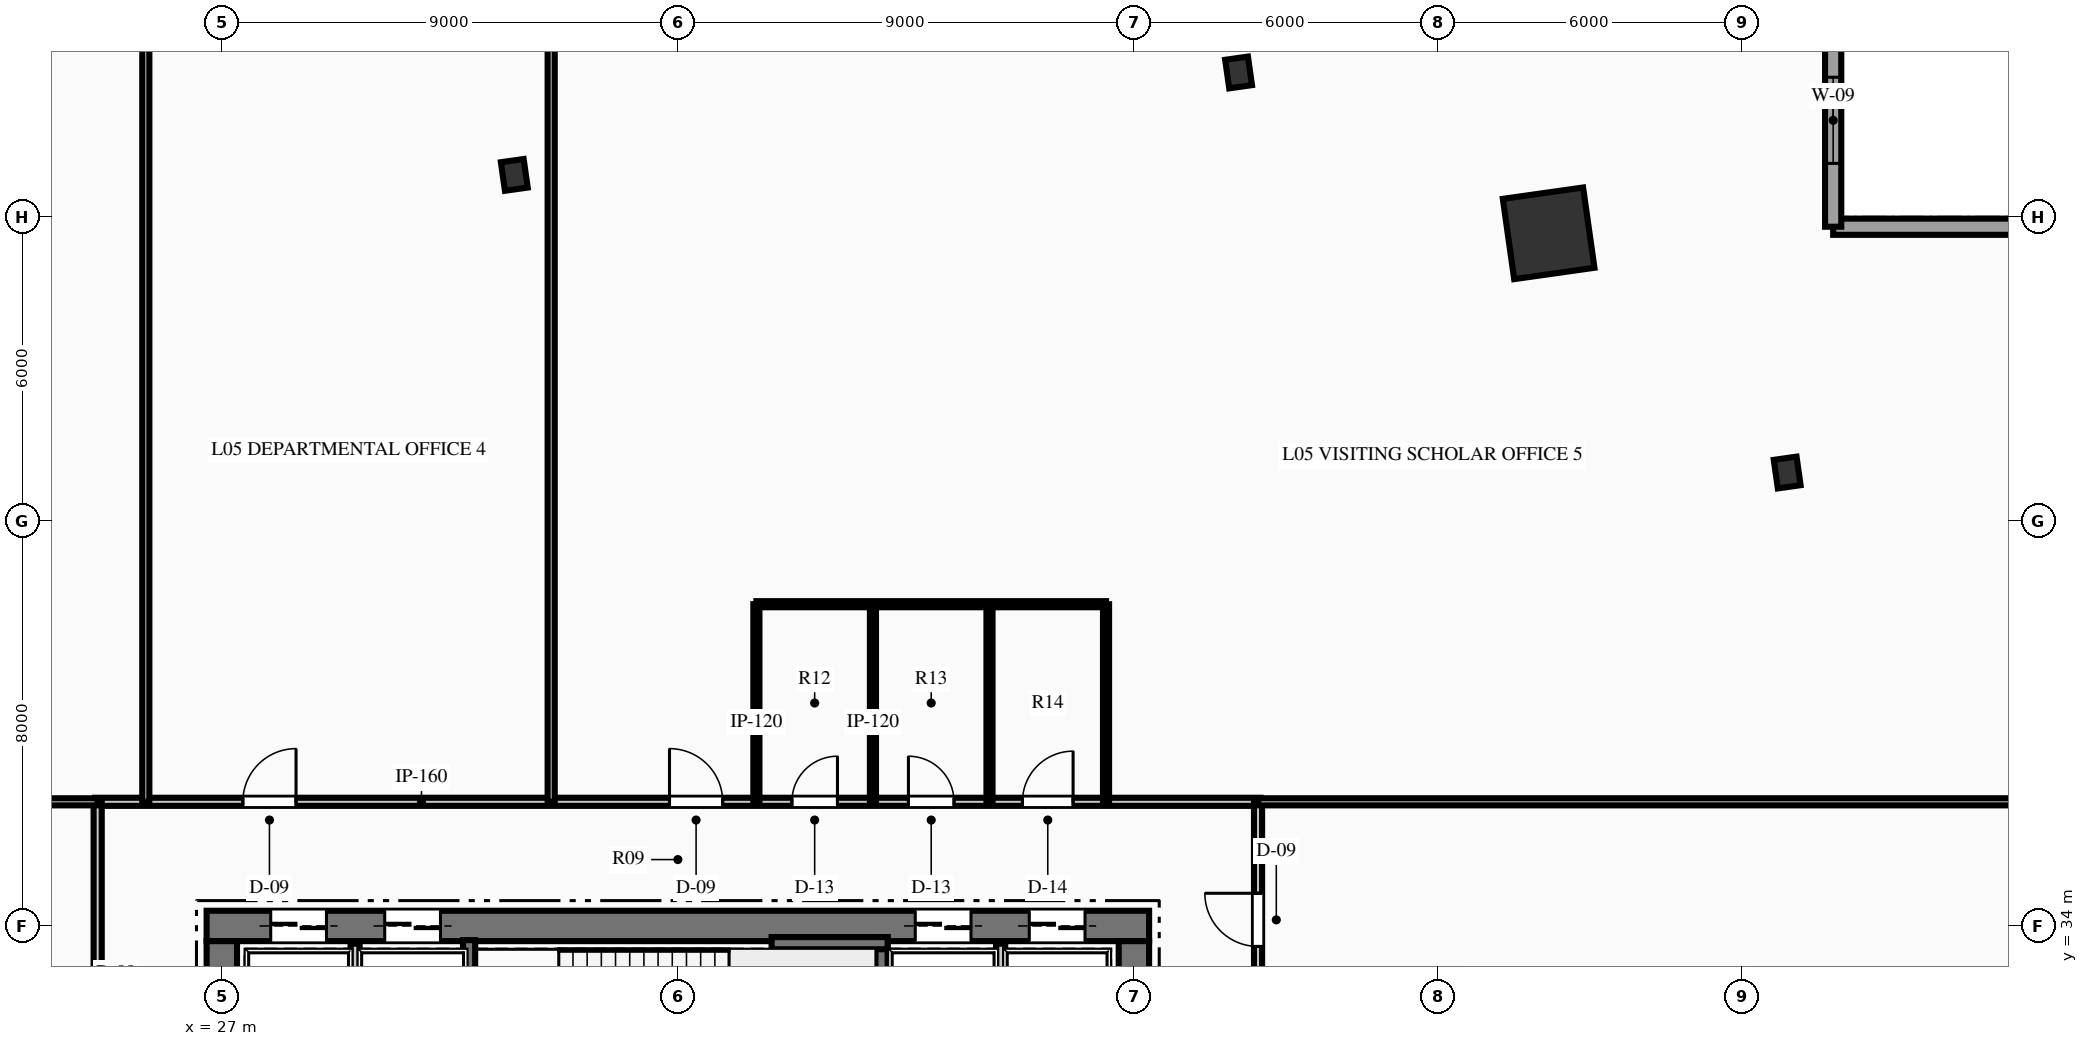
"""IFC4 building model, lengths in metres.
Left out: names, types, materials, properties, quantities, classifications, styles, units other than length and angle.
Written with IfcOpenShell. Run it as: python <this file> out.ifc"""

import sys

from ifc_helpers import new_model, si_unit, direction, frame, frame_2d, origin, origin_2d, place, context, subcontext, project, spatial, rectangle, hollow_rectangle, i_section, extrude, element, fill, save


model = new_model("IFC4")
c1 = context("Model", 3, precision=1e-05, world=origin(), true_north=direction((0.0, 1.0)))
c2 = subcontext(c1, "Body", "Model", "MODEL_VIEW")
j1 = project(units=[si_unit("LENGTHUNIT", "METRE"), si_unit("PLANEANGLEUNIT", "RADIAN")], contexts=[c1])
p1 = place(None, origin())
s1 = spatial("IfcSite", under=j1, at=p1, CompositionType="ELEMENT")
p2 = place(p1, origin())
s2 = spatial("IfcBuilding", under=s1, at=p2, CompositionType="ELEMENT")
p3 = place(p2, frame((0.0, 0.0, 28.2)))
s3 = spatial("IfcBuildingStorey", under=s2, at=p3, CompositionType="ELEMENT", Elevation=28.2)
p4 = place(p3, frame((26.7, 34.0, 0.0), z_axis=(0.0, 0.0, 1.0), x_axis=(1.0, 0.0, 0.0)))
e1 = element("IfcWall", 1, at=p4, inside=s3, PredefinedType="SHEAR", context=c2, shape_type="SweptSolid", body=[
    extrude(rectangle(XDim=18.6, YDim=0.6, at=frame_2d((9.3, 0.0))), origin(), (0.0, 0.0, 1.0), 4.5),
])
p5 = place(p4, frame((1.265, 0.0, 0.0)))
e2 = element("IfcOpeningElement", 2, at=p5, cuts=e1, PredefinedType="OPENING", context=c2, shape_type="SweptSolid", body=[
    extrude(rectangle(XDim=1.1, YDim=2.15, at=frame_2d((0.55, 1.075))), frame((0.0, 0.31, 0.0), z_axis=(0.0, -1.0, 0.0), x_axis=(1.0, 0.0, 0.0)), (0.0, 0.0, 1.0), 0.62),
])
p6 = place(p4, frame((3.515, 0.0, 0.0)))
e3 = element("IfcOpeningElement", 3, at=p6, cuts=e1, PredefinedType="OPENING", context=c2, shape_type="SweptSolid", body=[
    extrude(rectangle(XDim=1.1, YDim=2.15, at=frame_2d((0.55, 1.075))), frame((0.0, 0.31, 0.0), z_axis=(0.0, -1.0, 0.0), x_axis=(1.0, 0.0, 0.0)), (0.0, 0.0, 1.0), 0.62),
])
p7 = place(p4, frame((13.985, 0.0, 0.0)))
e4 = element("IfcOpeningElement", 4, at=p7, cuts=e1, PredefinedType="OPENING", context=c2, shape_type="SweptSolid", body=[
    extrude(rectangle(XDim=1.1, YDim=2.15, at=frame_2d((0.55, 1.075))), frame((0.0, 0.31, 0.0), z_axis=(0.0, -1.0, 0.0), x_axis=(1.0, 0.0, 0.0)), (0.0, 0.0, 1.0), 0.62),
])
p8 = place(p4, frame((16.235, 0.0, 0.0)))
e5 = element("IfcOpeningElement", 5, at=p8, cuts=e1, PredefinedType="OPENING", context=c2, shape_type="SweptSolid", body=[
    extrude(rectangle(XDim=1.1, YDim=2.15, at=frame_2d((0.55, 1.075))), frame((0.0, 0.31, 0.0), z_axis=(0.0, -1.0, 0.0), x_axis=(1.0, 0.0, 0.0)), (0.0, 0.0, 1.0), 0.62),
])
p9 = place(p3, frame((27.0, 18.3, 0.0), z_axis=(0.0, 0.0, 1.0), x_axis=(0.0, 1.0, 0.0)))
e6 = element("IfcWall", 6, at=p9, inside=s3, PredefinedType="SHEAR", context=c2, shape_type="SweptSolid", body=[
    extrude(rectangle(XDim=15.4, YDim=0.6, at=frame_2d((7.7, 0.0))), origin(), (0.0, 0.0, 1.0), 4.5),
])
p10 = place(p9, frame((9.94, 0.0, 0.0)))
e7 = element("IfcOpeningElement", 7, at=p10, cuts=e6, PredefinedType="OPENING", context=c2, shape_type="SweptSolid", body=[
    extrude(rectangle(XDim=1.4, YDim=2.2, at=frame_2d((0.7, 1.1))), frame((0.0, 0.31, 0.0), z_axis=(0.0, -1.0, 0.0), x_axis=(1.0, 0.0, 0.0)), (0.0, 0.0, 1.0), 0.62),
])
p11 = place(p3, frame((45.0, 18.3, 0.0), z_axis=(0.0, 0.0, 1.0), x_axis=(0.0, 1.0, 0.0)))
e8 = element("IfcWall", 8, at=p11, inside=s3, PredefinedType="SHEAR", context=c2, shape_type="SweptSolid", body=[
    extrude(rectangle(XDim=15.4, YDim=0.6, at=frame_2d((7.7, 0.0))), origin(), (0.0, 0.0, 1.0), 4.5),
])
p12 = place(p11, frame((9.94, 0.0, 0.0)))
e9 = element("IfcOpeningElement", 9, at=p12, cuts=e8, PredefinedType="OPENING", context=c2, shape_type="SweptSolid", body=[
    extrude(rectangle(XDim=1.4, YDim=2.2, at=frame_2d((0.7, 1.1))), frame((0.0, 0.31, 0.0), z_axis=(0.0, -1.0, 0.0), x_axis=(1.0, 0.0, 0.0)), (0.0, 0.0, 1.0), 0.62),
])
p13 = place(p3, frame((31.88, 29.93, 0.0), z_axis=(0.0, 0.0, 1.0), x_axis=(0.0, 1.0, 0.0)))
e10 = element("IfcWall", 10, at=p13, inside=s3, PredefinedType="SHEAR", context=c2, shape_type="SweptSolid", body=[
    extrude(rectangle(XDim=3.79, YDim=0.24, at=frame_2d((1.895, 0.0))), origin(), (0.0, 0.0, 1.0), 4.5),
])
p14 = place(p3, frame((40.02, 29.93, 0.0), z_axis=(0.0, 0.0, 1.0), x_axis=(0.0, 1.0, 0.0)))
e11 = element("IfcWall", 11, at=p14, inside=s3, PredefinedType="SHEAR", context=c2, shape_type="SweptSolid", body=[
    extrude(rectangle(XDim=3.85, YDim=0.24, at=frame_2d((1.925, 0.0))), origin(), (0.0, 0.0, 1.0), 4.5),
])
p15 = place(p3, frame((37.85, 33.66, 0.0), z_axis=(0.0, 0.0, 1.0), x_axis=(1.0, 0.0, 0.0)))
e12 = element("IfcWall", 12, at=p15, inside=s3, PredefinedType="SHEAR", context=c2, shape_type="SweptSolid", body=[
    extrude(rectangle(XDim=2.29, YDim=0.24, at=frame_2d((1.145, 0.0))), origin(), (0.0, 0.0, 1.0), 4.5),
])
p16 = place(p3, frame((53.185, 47.67, 0.0), z_axis=(0.0, 0.0, 1.0), x_axis=(0.990146240249, 0.140037219771, 0.0)))
e13 = element("IfcColumn", 13, at=p16, inside=s3, PredefinedType="COLUMN", context=c2, shape_type="SweptSolid", body=[
    extrude(hollow_rectangle(XDim=1.6, YDim=1.6, WallThickness=0.08, at=origin_2d()), origin(), (0.0, 0.0, 1.0), 4.5),
])
for number, where, z_axis, x_axis in (
    (14, (57.892, 42.949, 0.0), (0.0, 0.0, 1.0), (0.99, 0.14, 0.0)),
    (15, (47.066, 50.844, 0.0), (0.0, 0.0, 1.0), (0.99, 0.14, 0.0)),
    (16, (32.772, 48.823, 0.0), (0.0, 0.0, 1.0), (0.99, 0.14, 0.0)),
):
    element("IfcColumn", number, at=place(p3, frame(where, z_axis=z_axis, x_axis=x_axis)), inside=s3, PredefinedType="COLUMN", context=c2, shape_type="SweptSolid", body=[
        extrude(i_section(OverallWidth=0.454, OverallDepth=0.569, WebThickness=0.078, FlangeThickness=0.125, at=origin_2d()), origin(), (0.0, 0.0, 1.0), 4.5),
    ])
p17 = place(p3, frame((58.8, 47.8, 0.0), z_axis=(0.0, 0.0, 1.0), x_axis=(1.0, 0.0, 0.0)))
e17 = element("IfcWall", 17, at=p17, inside=s3, PredefinedType="STANDARD", context=c2, shape_type="SweptSolid", body=[
    extrude(rectangle(XDim=4.2, YDim=0.32, at=frame_2d((2.1, 0.0))), origin(), (0.0, 0.0, 1.0), 4.19),
])
p18 = place(p3, frame((58.8, 52.0, 0.0), z_axis=(0.0, 0.0, 1.0), x_axis=(0.0, -1.0, 0.0)))
e18 = element("IfcWall", 18, at=p18, inside=s3, PredefinedType="STANDARD", context=c2, shape_type="SweptSolid", body=[
    extrude(rectangle(XDim=4.2, YDim=0.32, at=frame_2d((2.1, 0.0))), origin(), (0.0, 0.0, 1.0), 4.19),
])
p19 = place(p18, frame((1.25, 0.0, 0.75)))
e19 = element("IfcOpeningElement", 19, at=p19, cuts=e18, PredefinedType="OPENING", context=c2, shape_type="SweptSolid", body=[
    extrude(rectangle(XDim=1.7, YDim=2.5, at=frame_2d((0.85, 1.25))), frame((0.0, 0.17, 0.0), z_axis=(0.0, -1.0, 0.0), x_axis=(1.0, 0.0, 0.0)), (0.0, 0.0, 1.0), 0.34),
])
for number, where, z_axis, x_axis in (
    (20, (29.63, 29.9, 0.0), (0.0, 0.0, 1.0), (0.0, 1.0, 0.0)),
    (21, (42.37, 29.9, 0.0), (0.0, 0.0, 1.0), (0.0, 1.0, 0.0)),
):
    element("IfcWall", number, at=place(p3, frame(where, z_axis=z_axis, x_axis=x_axis)), inside=s3, PredefinedType="PARTITIONING", context=c2, shape_type="SweptSolid", body=[
        extrude(rectangle(XDim=3.75, YDim=0.18, at=frame_2d((1.875, 0.0))), origin(), (0.0, 0.0, 1.0), 4.19),
    ])
p20 = place(p3, frame((24.5, 36.45, 0.0), z_axis=(0.0, 0.0, 1.0), x_axis=(1.0, 0.0, 0.0)))
e22 = element("IfcWall", 22, at=p20, inside=s3, PredefinedType="PARTITIONING", context=c2, shape_type="SweptSolid", body=[
    extrude(rectangle(XDim=23.0, YDim=0.16, at=frame_2d((11.5, 0.0))), origin(), (0.0, 0.0, 1.0), 4.19),
])
p21 = place(p20, frame((13.75, 0.0, 0.0)))
e23 = element("IfcOpeningElement", 23, at=p21, cuts=e22, PredefinedType="OPENING", context=c2, shape_type="SweptSolid", body=[
    extrude(rectangle(XDim=0.9, YDim=2.15, at=frame_2d((0.45, 1.075))), frame((0.0, 0.09, 0.0), z_axis=(0.0, -1.0, 0.0), x_axis=(1.0, 0.0, 0.0)), (0.0, 0.0, 1.0), 0.18),
])
p22 = place(p20, frame((16.05, 0.0, 0.0)))
e24 = element("IfcOpeningElement", 24, at=p22, cuts=e22, PredefinedType="OPENING", context=c2, shape_type="SweptSolid", body=[
    extrude(rectangle(XDim=0.9, YDim=2.15, at=frame_2d((0.45, 1.075))), frame((0.0, 0.09, 0.0), z_axis=(0.0, -1.0, 0.0), x_axis=(1.0, 0.0, 0.0)), (0.0, 0.0, 1.0), 0.18),
])
p23 = place(p20, frame((18.3, 0.0, 0.0)))
e25 = element("IfcOpeningElement", 25, at=p23, cuts=e22, PredefinedType="OPENING", context=c2, shape_type="SweptSolid", body=[
    extrude(rectangle(XDim=1.0, YDim=2.15, at=frame_2d((0.5, 1.075))), frame((0.0, 0.09, 0.0), z_axis=(0.0, -1.0, 0.0), x_axis=(1.0, 0.0, 0.0)), (0.0, 0.0, 1.0), 0.18),
])
p24 = place(p20, frame((2.915, 0.0, 0.0)))
e26 = element("IfcOpeningElement", 26, at=p24, cuts=e22, PredefinedType="OPENING", context=c2, shape_type="SweptSolid", body=[
    extrude(rectangle(XDim=1.05, YDim=2.15, at=frame_2d((0.525, 1.075))), frame((0.0, 0.09, 0.0), z_axis=(0.0, -1.0, 0.0), x_axis=(1.0, 0.0, 0.0)), (0.0, 0.0, 1.0), 0.18),
])
p25 = place(p20, frame((11.335, 0.0, 0.0)))
e27 = element("IfcOpeningElement", 27, at=p25, cuts=e22, PredefinedType="OPENING", context=c2, shape_type="SweptSolid", body=[
    extrude(rectangle(XDim=1.05, YDim=2.15, at=frame_2d((0.525, 1.075))), frame((0.0, 0.09, 0.0), z_axis=(0.0, -1.0, 0.0), x_axis=(1.0, 0.0, 0.0)), (0.0, 0.0, 1.0), 0.18),
])
p26 = place(p3, frame((24.55, 15.55, 0.0), z_axis=(0.0, 0.0, 1.0), x_axis=(0.0, 1.0, 0.0)))
e28 = element("IfcWall", 28, at=p26, inside=s3, PredefinedType="PARTITIONING", context=c2, shape_type="SweptSolid", body=[
    extrude(rectangle(XDim=20.9, YDim=0.16, at=frame_2d((10.45, 0.0))), origin(), (0.0, 0.0, 1.0), 4.19),
])
p27 = place(p26, frame((2.052, 0.0, 0.0)))
e29 = element("IfcOpeningElement", 29, at=p27, cuts=e28, PredefinedType="OPENING", context=c2, shape_type="SweptSolid", body=[
    extrude(rectangle(XDim=1.05, YDim=2.15, at=frame_2d((0.525, 1.075))), frame((0.0, 0.09, 0.0), z_axis=(0.0, -1.0, 0.0), x_axis=(1.0, 0.0, 0.0)), (0.0, 0.0, 1.0), 0.18),
])
p28 = place(p26, frame((15.645, 0.0, 0.0)))
e30 = element("IfcOpeningElement", 30, at=p28, cuts=e28, PredefinedType="OPENING", context=c2, shape_type="SweptSolid", body=[
    extrude(rectangle(XDim=1.05, YDim=2.15, at=frame_2d((0.525, 1.075))), frame((0.0, 0.09, 0.0), z_axis=(0.0, -1.0, 0.0), x_axis=(1.0, 0.0, 0.0)), (0.0, 0.0, 1.0), 0.18),
])
p29 = place(p3, frame((47.45, 15.55, 0.0), z_axis=(0.0, 0.0, 1.0), x_axis=(0.0, 1.0, 0.0)))
e31 = element("IfcWall", 31, at=p29, inside=s3, PredefinedType="PARTITIONING", context=c2, shape_type="SweptSolid", body=[
    extrude(rectangle(XDim=20.9, YDim=0.16, at=frame_2d((10.45, 0.0))), origin(), (0.0, 0.0, 1.0), 4.19),
])
p30 = place(p29, frame((3.747, 0.0, 0.0)))
e32 = element("IfcOpeningElement", 32, at=p30, cuts=e31, PredefinedType="OPENING", context=c2, shape_type="SweptSolid", body=[
    extrude(rectangle(XDim=1.05, YDim=2.15, at=frame_2d((0.525, 1.075))), frame((0.0, 0.09, 0.0), z_axis=(0.0, -1.0, 0.0), x_axis=(1.0, 0.0, 0.0)), (0.0, 0.0, 1.0), 0.18),
])
p31 = place(p29, frame((7.865, 0.0, 0.0)))
e33 = element("IfcOpeningElement", 33, at=p31, cuts=e31, PredefinedType="OPENING", context=c2, shape_type="SweptSolid", body=[
    extrude(rectangle(XDim=1.05, YDim=2.15, at=frame_2d((0.525, 1.075))), frame((0.0, 0.09, 0.0), z_axis=(0.0, -1.0, 0.0), x_axis=(1.0, 0.0, 0.0)), (0.0, 0.0, 1.0), 0.18),
])
p32 = place(p29, frame((18.045, 0.0, 0.0)))
e34 = element("IfcOpeningElement", 34, at=p32, cuts=e31, PredefinedType="OPENING", context=c2, shape_type="SweptSolid", body=[
    extrude(rectangle(XDim=1.05, YDim=2.15, at=frame_2d((0.525, 1.075))), frame((0.0, 0.09, 0.0), z_axis=(0.0, -1.0, 0.0), x_axis=(1.0, 0.0, 0.0)), (0.0, 0.0, 1.0), 0.18),
])
for number, where, z_axis, x_axis in (
    (35, (37.55, 36.45, 0.0), (0.0, 0.0, 1.0), (0.0, 1.0, 0.0)),
    (36, (39.85, 36.45, 0.0), (0.0, 0.0, 1.0), (0.0, 1.0, 0.0)),
    (37, (42.15, 36.45, 0.0), (0.0, 0.0, 1.0), (0.0, 1.0, 0.0)),
    (38, (44.45, 36.45, 0.0), (0.0, 0.0, 1.0), (0.0, 1.0, 0.0)),
):
    element("IfcWall", number, at=place(p3, frame(where, z_axis=z_axis, x_axis=x_axis)), inside=s3, PredefinedType="PARTITIONING", context=c2, shape_type="SweptSolid", body=[
        extrude(rectangle(XDim=3.9, YDim=0.12, at=frame_2d((1.95, 0.0))), origin(), (0.0, 0.0, 1.0), 4.19),
    ])
p33 = place(p3, frame((37.55, 40.35, 0.0), z_axis=(0.0, 0.0, 1.0), x_axis=(1.0, 0.0, 0.0)))
e39 = element("IfcWall", 39, at=p33, inside=s3, PredefinedType="PARTITIONING", context=c2, shape_type="SweptSolid", body=[
    extrude(rectangle(XDim=6.9, YDim=0.12, at=frame_2d((3.45, 0.0))), origin(), (0.0, 0.0, 1.0), 4.19),
])
p34 = place(p3, frame((9.04, 36.45, 0.0), z_axis=(0.0, 0.0, 1.0), x_axis=(1.0, 0.0, 0.0)))
e40 = element("IfcWall", 40, at=p34, inside=s3, PredefinedType="PARTITIONING", context=c2, shape_type="SweptSolid", body=[
    extrude(rectangle(XDim=15.51, YDim=0.14, at=frame_2d((7.755, 0.0))), origin(), (0.0, 0.0, 1.0), 3.489),
])
p35 = place(p34, frame((10.51, 0.0, 0.0)))
e41 = element("IfcOpeningElement", 41, at=p35, cuts=e40, PredefinedType="OPENING", context=c2, shape_type="SweptSolid", body=[
    extrude(rectangle(XDim=0.95, YDim=2.15, at=frame_2d((0.475, 1.075))), frame((0.0, 0.08, 0.0), z_axis=(0.0, -1.0, 0.0), x_axis=(1.0, 0.0, 0.0)), (0.0, 0.0, 1.0), 0.16),
])
for number, where, z_axis, x_axis in (
    (42, (47.45, 36.45, 0.0), (0.0, 0.0, 1.0), (1.0, 0.0, 0.0)),
    (43, (25.5, 36.45, 0.0), (0.0, 0.0, 1.0), (0.0, 1.0, 0.0)),
    (44, (33.5, 36.45, 0.0), (0.0, 0.0, 1.0), (0.0, 1.0, 0.0)),
):
    element("IfcWall", number, at=place(p3, frame(where, z_axis=z_axis, x_axis=x_axis)), inside=s3, PredefinedType="PARTITIONING", context=c2, shape_type="SweptSolid", body=[
        extrude(rectangle(XDim=15.51, YDim=0.14, at=frame_2d((7.755, 0.0))), origin(), (0.0, 0.0, 1.0), 4.19),
    ])
p36 = place(p19, origin())
e45 = element("IfcWindow", 45, at=p36, inside=s3, PartitioningType="SINGLE_PANEL", PredefinedType="WINDOW", context=c2, shape_type="SweptSolid", body=[
    extrude(rectangle(XDim=1.7, YDim=2.5, at=frame_2d((0.85, 1.25))), frame((0.0, 0.03, 0.0), z_axis=(0.0, -1.0, 0.0), x_axis=(1.0, 0.0, 0.0)), (0.0, 0.0, 1.0), 0.06),
])
fill(e19, e45)
p37 = place(p21, origin())
e46 = element("IfcDoor", 46, at=p37, inside=s3, OperationType="SINGLE_SWING_RIGHT", PredefinedType="DOOR", context=c2, shape_type="SweptSolid", body=[
    extrude(rectangle(XDim=0.9, YDim=2.15, at=frame_2d((0.45, 1.075))), frame((0.0, 0.025, 0.0), z_axis=(0.0, -1.0, 0.0), x_axis=(1.0, 0.0, 0.0)), (0.0, 0.0, 1.0), 0.05),
])
fill(e23, e46)
p38 = place(p22, origin())
e47 = element("IfcDoor", 47, at=p38, inside=s3, OperationType="SINGLE_SWING_LEFT", PredefinedType="DOOR", context=c2, shape_type="SweptSolid", body=[
    extrude(rectangle(XDim=0.9, YDim=2.15, at=frame_2d((0.45, 1.075))), frame((0.0, 0.025, 0.0), z_axis=(0.0, -1.0, 0.0), x_axis=(1.0, 0.0, 0.0)), (0.0, 0.0, 1.0), 0.05),
])
fill(e24, e47)
p39 = place(p23, origin())
e48 = element("IfcDoor", 48, at=p39, inside=s3, OperationType="SINGLE_SWING_RIGHT", PredefinedType="DOOR", context=c2, shape_type="SweptSolid", body=[
    extrude(rectangle(XDim=1.0, YDim=2.15, at=frame_2d((0.5, 1.075))), frame((0.0, 0.025, 0.0), z_axis=(0.0, -1.0, 0.0), x_axis=(1.0, 0.0, 0.0)), (0.0, 0.0, 1.0), 0.05),
])
fill(e25, e48)
p40 = place(p24, origin())
e49 = element("IfcDoor", 49, at=p40, inside=s3, OperationType="SINGLE_SWING_RIGHT", PredefinedType="DOOR", context=c2, shape_type="SweptSolid", body=[
    extrude(rectangle(XDim=1.05, YDim=2.15, at=frame_2d((0.525, 1.075))), frame((0.0, 0.025, 0.0), z_axis=(0.0, -1.0, 0.0), x_axis=(1.0, 0.0, 0.0)), (0.0, 0.0, 1.0), 0.05),
])
fill(e26, e49)
p41 = place(p25, origin())
e50 = element("IfcDoor", 50, at=p41, inside=s3, OperationType="SINGLE_SWING_LEFT", PredefinedType="DOOR", context=c2, shape_type="SweptSolid", body=[
    extrude(rectangle(XDim=1.05, YDim=2.15, at=frame_2d((0.525, 1.075))), frame((0.0, 0.025, 0.0), z_axis=(0.0, -1.0, 0.0), x_axis=(1.0, 0.0, 0.0)), (0.0, 0.0, 1.0), 0.05),
])
fill(e27, e50)
p42 = place(p32, origin())
e51 = element("IfcDoor", 51, at=p42, inside=s3, OperationType="SINGLE_SWING_RIGHT", PredefinedType="DOOR", context=c2, shape_type="SweptSolid", body=[
    extrude(rectangle(XDim=1.05, YDim=2.15, at=frame_2d((0.525, 1.075))), frame((0.0, 0.025, 0.0), z_axis=(0.0, -1.0, 0.0), x_axis=(1.0, 0.0, 0.0)), (0.0, 0.0, 1.0), 0.05),
])
fill(e34, e51)
p43 = place(p5, origin())
e52 = element("IfcDoor", 52, at=p43, inside=s3, OperationType="SLIDING_TO_LEFT", PredefinedType="DOOR", context=c2, shape_type="SweptSolid", body=[
    extrude(rectangle(XDim=1.1, YDim=2.15, at=frame_2d((0.55, 1.075))), frame((0.0, 0.025, 0.0), z_axis=(0.0, -1.0, 0.0), x_axis=(1.0, 0.0, 0.0)), (0.0, 0.0, 1.0), 0.05),
])
fill(e2, e52)
p44 = place(p6, origin())
e53 = element("IfcDoor", 53, at=p44, inside=s3, OperationType="SLIDING_TO_LEFT", PredefinedType="DOOR", context=c2, shape_type="SweptSolid", body=[
    extrude(rectangle(XDim=1.1, YDim=2.15, at=frame_2d((0.55, 1.075))), frame((0.0, 0.025, 0.0), z_axis=(0.0, -1.0, 0.0), x_axis=(1.0, 0.0, 0.0)), (0.0, 0.0, 1.0), 0.05),
])
fill(e3, e53)
p45 = place(p7, origin())
e54 = element("IfcDoor", 54, at=p45, inside=s3, OperationType="SLIDING_TO_LEFT", PredefinedType="DOOR", context=c2, shape_type="SweptSolid", body=[
    extrude(rectangle(XDim=1.1, YDim=2.15, at=frame_2d((0.55, 1.075))), frame((0.0, 0.025, 0.0), z_axis=(0.0, -1.0, 0.0), x_axis=(1.0, 0.0, 0.0)), (0.0, 0.0, 1.0), 0.05),
])
fill(e4, e54)
p46 = place(p8, origin())
e55 = element("IfcDoor", 55, at=p46, inside=s3, OperationType="SLIDING_TO_LEFT", PredefinedType="DOOR", context=c2, shape_type="SweptSolid", body=[
    extrude(rectangle(XDim=1.1, YDim=2.15, at=frame_2d((0.55, 1.075))), frame((0.0, 0.025, 0.0), z_axis=(0.0, -1.0, 0.0), x_axis=(1.0, 0.0, 0.0)), (0.0, 0.0, 1.0), 0.05),
])
fill(e5, e55)
save(model, sys.argv[1])
